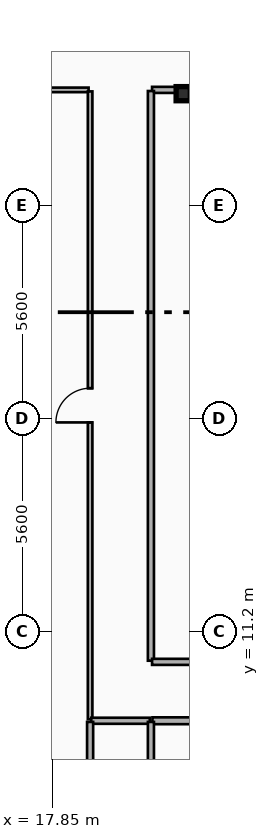
"""IFC4 building model, lengths in metres.
Left out: names, types, materials, properties, quantities, classifications, styles, units other than length and angle.
Written with IfcOpenShell. Run it as: python <this file> out.ifc"""

import sys

from ifc_helpers import new_model, si_unit, direction, frame, frame_2d, origin, origin_2d, place, context, subcontext, project, spatial, rectangle, i_section, extrude, element, fill, save


model = new_model("IFC4")
c1 = context("Model", 3, precision=1e-05, world=origin(), true_north=direction((0.0, 1.0)))
c2 = subcontext(c1, "Body", "Model", "MODEL_VIEW")
j1 = project(units=[si_unit("LENGTHUNIT", "METRE"), si_unit("PLANEANGLEUNIT", "RADIAN")], contexts=[c1])
p1 = place(None, origin())
s1 = spatial("IfcSite", under=j1, at=p1, CompositionType="ELEMENT")
p2 = place(p1, origin())
s2 = spatial("IfcBuilding", under=s1, at=p2, CompositionType="ELEMENT")
p3 = place(p2, frame((0.0, 0.0, 265.8)))
s3 = spatial("IfcBuildingStorey", under=s2, at=p3, CompositionType="ELEMENT", Elevation=265.8)
p4 = place(p3, frame((21.3, 25.35, 0.0), z_axis=(0.0, 0.0, 1.0), x_axis=(1.0, 0.0, 0.0)))
e1 = element("IfcColumn", 1, at=p4, inside=s3, PredefinedType="COLUMN", context=c2, shape_type="SweptSolid", body=[
    extrude(i_section(OverallWidth=0.374, OverallDepth=0.372, WebThickness=0.017, FlangeThickness=0.027, FilletRadius=0.015, at=origin_2d()), origin(), (0.0, 0.0, 1.0), 3.7),
])
p5 = place(p3, frame((13.84, 25.45, 0.0), z_axis=(0.0, 0.0, 1.0), x_axis=(1.0, 0.0, 0.0)))
e2 = element("IfcWall", 2, at=p5, inside=s3, PredefinedType="PARTITIONING", context=c2, shape_type="SweptSolid", body=[
    extrude(rectangle(XDim=4.97, YDim=0.12, at=frame_2d((2.485, 0.0))), origin(), (0.0, 0.0, 1.0), 3.42),
])
p6 = place(p5, frame((2.035, 0.0, 0.0)))
e3 = element("IfcOpeningElement", 3, at=p6, cuts=e2, PredefinedType="OPENING", context=c2, shape_type="SweptSolid", body=[
    extrude(rectangle(XDim=0.9, YDim=2.1, at=frame_2d((0.45, 1.05))), frame((0.0, 0.07, 0.0), z_axis=(0.0, -1.0, 0.0), x_axis=(1.0, 0.0, 0.0)), (0.0, 0.0, 1.0), 0.14),
])
p7 = place(p3, frame((18.85, 8.89, 0.0), z_axis=(0.0, 0.0, 1.0), x_axis=(0.0, 1.0, 0.0)))
e4 = element("IfcWall", 4, at=p7, inside=s3, PredefinedType="PARTITIONING", context=c2, shape_type="SweptSolid", body=[
    extrude(rectangle(XDim=16.52, YDim=0.12, at=frame_2d((8.26, 0.0))), origin(), (0.0, 0.0, 1.0), 2.91),
])
p8 = place(p7, frame((7.81, 0.0, 0.0)))
e5 = element("IfcOpeningElement", 5, at=p8, cuts=e4, PredefinedType="OPENING", context=c2, shape_type="SweptSolid", body=[
    extrude(rectangle(XDim=0.9, YDim=2.1, at=frame_2d((0.45, 1.05))), frame((0.0, 0.07, 0.0), z_axis=(0.0, -1.0, 0.0), x_axis=(1.0, 0.0, 0.0)), (0.0, 0.0, 1.0), 0.14),
])
p9 = place(p3, frame((20.49, 8.85, 0.0), z_axis=(0.0, 0.0, 1.0), x_axis=(1.0, 0.0, 0.0)))
e6 = element("IfcWall", 6, at=p9, inside=s3, PredefinedType="PLUMBINGWALL", context=c2, shape_type="SweptSolid", body=[
    extrude(rectangle(XDim=1.895, YDim=0.18, at=frame_2d((0.948, 0.0))), origin(), (0.0, 0.0, 1.0), 2.7),
])
p10 = place(p3, frame((20.48, 25.45, 0.0), z_axis=(0.0, 0.0, 1.0), x_axis=(1.0, 0.0, 0.0)))
e7 = element("IfcWall", 7, at=p10, inside=s3, PredefinedType="PARTITIONING", context=c2, shape_type="SweptSolid", body=[
    extrude(rectangle(XDim=15.84, YDim=0.16, at=frame_2d((7.92, 0.0))), origin(), (0.0, 0.0, 1.0), 2.7),
])
p11 = place(p3, frame((18.88, 8.85, 0.0), z_axis=(0.0, 0.0, 1.0), x_axis=(1.0, 0.0, 0.0)))
e8 = element("IfcWall", 8, at=p11, inside=s3, PredefinedType="PARTITIONING", context=c2, shape_type="SweptSolid", body=[
    extrude(rectangle(XDim=1.54, YDim=0.16, at=frame_2d((0.77, 0.0))), origin(), (0.0, 0.0, 1.0), 3.42),
])
p12 = place(p3, frame((20.45, 10.43, 0.0), z_axis=(0.0, 0.0, 1.0), x_axis=(0.0, 1.0, 0.0)))
e9 = element("IfcWall", 9, at=p12, inside=s3, PredefinedType="PARTITIONING", context=c2, shape_type="SweptSolid", body=[
    extrude(rectangle(XDim=14.99, YDim=0.16, at=frame_2d((7.495, 0.0))), origin(), (0.0, 0.0, 1.0), 2.91),
])
p13 = place(p3, frame((20.48, 10.4, 0.0), z_axis=(0.0, 0.0, 1.0), x_axis=(1.0, 0.0, 0.0)))
e10 = element("IfcWall", 10, at=p13, inside=s3, PredefinedType="PARTITIONING", context=c2, shape_type="SweptSolid", body=[
    extrude(rectangle(XDim=2.64, YDim=0.16, at=frame_2d((1.32, 0.0))), origin(), (0.0, 0.0, 1.0), 2.7),
])
p14 = place(p3, frame((18.85, -1.31, 0.0), z_axis=(0.0, 0.0, 1.0), x_axis=(0.0, 1.0, 0.0)))
e11 = element("IfcWall", 11, at=p14, inside=s3, PredefinedType="PARTITIONING", context=c2, shape_type="SweptSolid", body=[
    extrude(rectangle(XDim=10.13, YDim=0.16, at=frame_2d((5.065, 0.0))), origin(), (0.0, 0.0, 1.0), 2.91),
])
p15 = place(p3, frame((20.45, 5.212, 0.0), z_axis=(0.0, 0.0, 1.0), x_axis=(0.0, 1.0, 0.0)))
e12 = element("IfcWall", 12, at=p15, inside=s3, PredefinedType="PARTITIONING", context=c2, shape_type="SweptSolid", body=[
    extrude(rectangle(XDim=3.608, YDim=0.16, at=frame_2d((1.804, 0.0))), origin(), (0.0, 0.0, 1.0), 2.91),
])
p16 = place(p8, origin())
e13 = element("IfcDoor", 13, at=p16, inside=s3, OperationType="SINGLE_SWING_LEFT", PredefinedType="DOOR", context=c2, shape_type="SweptSolid", body=[
    extrude(rectangle(XDim=0.9, YDim=2.1, at=frame_2d((0.45, 1.05))), frame((0.0, 0.025, 0.0), z_axis=(0.0, -1.0, 0.0), x_axis=(1.0, 0.0, 0.0)), (0.0, 0.0, 1.0), 0.05),
])
fill(e5, e13)
save(model, sys.argv[1])
